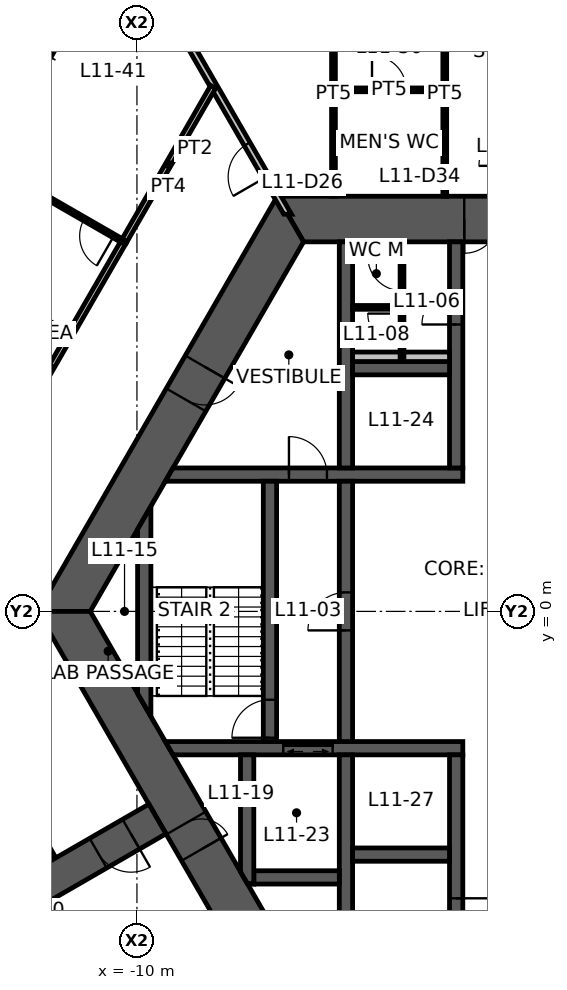
"""IFC4 building model, lengths in metres.
Left out: names, types, materials, properties, quantities, classifications, styles, units other than length and angle.
Written with IfcOpenShell. Run it as: python <this file> out.ifc"""

import sys

from ifc_helpers import new_model, si_unit, direction, frame, frame_2d, origin, place, context, subcontext, project, spatial, polyline, rectangle, outline, extrude, element, fill, save


model = new_model("IFC4")
c1 = context("Model", 3, precision=1e-05, world=origin(), true_north=direction((0.0, 1.0)))
c2 = subcontext(c1, "Body", "Model", "MODEL_VIEW")
j1 = project(units=[si_unit("LENGTHUNIT", "METRE"), si_unit("PLANEANGLEUNIT", "RADIAN")], contexts=[c1])
p1 = place(None, origin())
s1 = spatial("IfcSite", under=j1, at=p1, CompositionType="ELEMENT")
p2 = place(p1, origin())
s2 = spatial("IfcBuilding", under=s1, at=p2, CompositionType="ELEMENT")
p3 = place(p2, frame((0.0, 0.0, 43.6)))
s3 = spatial("IfcBuildingStorey", under=s2, at=p3, CompositionType="ELEMENT", Elevation=43.6)
p4 = place(p3, frame((5.961, 10.325, 0.0), z_axis=(0.0, 0.0, 1.0), x_axis=(-1.0, 0.0, 0.0)))
e1 = element("IfcWall", 1, at=p4, inside=s3, PredefinedType="SHEAR", context=c2, shape_type="SweptSolid", body=[
    extrude(outline(polyline([(-0.346, -0.6), (4.574, -0.6), (5.474, -0.6), (6.449, -0.6), (7.349, -0.6), (12.269, -0.6), (11.576, 0.6), (7.349, 0.6), (6.449, 0.6), (5.474, 0.6), (4.574, 0.6), (0.346, 0.6), (-0.346, -0.6)])), origin(), (0.0, 0.0, 1.0), 4.2),
])
p5 = place(p4, frame((6.449, 0.0, 0.0)))
e2 = element("IfcOpeningElement", 2, at=p5, cuts=e1, PredefinedType="OPENING", context=c2, shape_type="SweptSolid", body=[
    extrude(rectangle(XDim=0.9, YDim=2.1, at=frame_2d((0.45, 1.05))), frame((0.0, 0.61, 0.0), z_axis=(0.0, -1.0, 0.0), x_axis=(1.0, 0.0, 0.0)), (0.0, 0.0, 1.0), 1.22),
])
p6 = place(p4, frame((4.574, 0.0, 0.0)))
e3 = element("IfcOpeningElement", 3, at=p6, cuts=e1, PredefinedType="OPENING", context=c2, shape_type="SweptSolid", body=[
    extrude(rectangle(XDim=0.9, YDim=2.1, at=frame_2d((0.45, 1.05))), frame((0.0, 0.61, 0.0), z_axis=(0.0, -1.0, 0.0), x_axis=(1.0, 0.0, 0.0)), (0.0, 0.0, 1.0), 1.22),
])
p7 = place(p3, frame((-5.961, 10.325, 0.0), z_axis=(0.0, 0.0, 1.0), x_axis=(-0.500004296715, -0.866022923061, 0.0)))
e4 = element("IfcWall", 4, at=p7, inside=s3, PredefinedType="SHEAR", context=c2, shape_type="SweptSolid", body=[
    extrude(outline(polyline([(-0.346, -0.6), (4.494, -0.6), (5.494, -0.6), (12.269, -0.6), (11.576, 0.6), (5.494, 0.6), (4.494, 0.6), (0.346, 0.6), (-0.346, -0.6)])), origin(), (0.0, 0.0, 1.0), 4.2),
])
p8 = place(p7, frame((4.494, 0.0, 0.0)))
e5 = element("IfcOpeningElement", 5, at=p8, cuts=e4, PredefinedType="OPENING", context=c2, shape_type="SweptSolid", body=[
    extrude(rectangle(XDim=1.0, YDim=2.1, at=frame_2d((0.5, 1.05))), frame((0.0, 0.61, 0.0), z_axis=(0.0, -1.0, 0.0), x_axis=(1.0, 0.0, 0.0)), (0.0, 0.0, 1.0), 1.22),
])
p9 = place(p3, frame((-11.922, 0.0, 0.0), z_axis=(0.0, 0.0, 1.0), x_axis=(0.500004296715, -0.866022923061, 0.0)))
e6 = element("IfcWall", 6, at=p9, inside=s3, PredefinedType="SHEAR", context=c2, shape_type="SweptSolid", body=[
    extrude(outline(polyline([(-0.346, -0.6), (6.431, -0.6), (7.231, -0.6), (12.269, -0.6), (11.576, 0.6), (7.231, 0.6), (6.431, 0.6), (0.346, 0.6), (-0.346, -0.6)])), origin(), (0.0, 0.0, 1.0), 4.2),
])
p10 = place(p9, frame((6.431, 0.0, 0.0)))
e7 = element("IfcOpeningElement", 7, at=p10, cuts=e6, PredefinedType="OPENING", context=c2, shape_type="SweptSolid", body=[
    extrude(rectangle(XDim=0.8, YDim=2.1, at=frame_2d((0.4, 1.05))), frame((0.0, 0.61, 0.0), z_axis=(0.0, -1.0, 0.0), x_axis=(1.0, 0.0, 0.0)), (0.0, 0.0, 1.0), 1.22),
])
p11 = place(p3, frame((-9.461, -5.462, 0.0), z_axis=(0.0, 0.0, 1.0), x_axis=(-0.866019116917, -0.500010889016, 0.0)))
e8 = element("IfcWall", 8, at=p11, inside=s3, PredefinedType="SHEAR", context=c2, shape_type="SweptSolid", body=[
    extrude(rectangle(XDim=7.595, YDim=0.9, at=frame_2d((3.798, 0.0))), origin(), (0.0, 0.0, 1.0), 4.2),
])
p12 = place(p11, frame((0.8, 0.0, 0.0)))
e9 = element("IfcOpeningElement", 9, at=p12, cuts=e8, PredefinedType="OPENING", context=c2, shape_type="SweptSolid", body=[
    extrude(rectangle(XDim=1.0, YDim=2.1, at=frame_2d((0.5, 1.05))), frame((0.0, 0.46, 0.0), z_axis=(0.0, -1.0, 0.0), x_axis=(1.0, 0.0, 0.0)), (0.0, 0.0, 1.0), 0.92),
])
p13 = place(p3, frame((-9.151, 3.6, 0.0), z_axis=(0.0, 0.0, 1.0), x_axis=(1.0, 0.0, 0.0)))
e10 = element("IfcWall", 10, at=p13, inside=s3, PredefinedType="SHEAR", context=c2, shape_type="SweptSolid", body=[
    extrude(outline(polyline([(-0.101, -0.175), (3.151, -0.175), (4.151, -0.175), (7.726, -0.175), (7.726, 0.175), (4.151, 0.175), (3.151, 0.175), (0.101, 0.175), (-0.101, -0.175)])), origin(), (0.0, 0.0, 1.0), 4.2),
])
p14 = place(p13, frame((3.151, 0.0, 0.0)))
e11 = element("IfcOpeningElement", 11, at=p14, cuts=e10, PredefinedType="OPENING", context=c2, shape_type="SweptSolid", body=[
    extrude(rectangle(XDim=1.0, YDim=2.1, at=frame_2d((0.5, 1.05))), frame((0.0, 0.185, 0.0), z_axis=(0.0, -1.0, 0.0), x_axis=(1.0, 0.0, 0.0)), (0.0, 0.0, 1.0), 0.37),
])
p15 = place(p3, frame((-9.151, -3.6, 0.0), z_axis=(0.0, 0.0, 1.0), x_axis=(1.0, 0.0, 0.0)))
e12 = element("IfcWall", 12, at=p15, inside=s3, PredefinedType="SHEAR", context=c2, shape_type="SweptSolid", body=[
    extrude(outline(polyline([(0.101, -0.175), (3.001, -0.175), (4.301, -0.175), (7.726, -0.175), (7.726, 0.175), (4.301, 0.175), (3.001, 0.175), (-0.101, 0.175), (0.101, -0.175)])), origin(), (0.0, 0.0, 1.0), 4.2),
])
p16 = place(p15, frame((3.001, 0.0, 0.0)))
e13 = element("IfcOpeningElement", 13, at=p16, cuts=e12, PredefinedType="OPENING", context=c2, shape_type="SweptSolid", body=[
    extrude(rectangle(XDim=1.3, YDim=2.1, at=frame_2d((0.65, 1.05))), frame((0.0, 0.185, 0.0), z_axis=(0.0, -1.0, 0.0), x_axis=(1.0, 0.0, 0.0)), (0.0, 0.0, 1.0), 0.37),
])
p17 = place(p3, frame((-1.6, 3.775, 0.0), z_axis=(0.0, 0.0, 1.0), x_axis=(0.0, 1.0, 0.0)))
e14 = element("IfcWall", 14, at=p17, inside=s3, PredefinedType="SHEAR", context=c2, shape_type="SweptSolid", body=[
    extrude(rectangle(XDim=5.95, YDim=0.35, at=frame_2d((2.975, 0.0))), origin(), (0.0, 0.0, 1.0), 4.2),
])
p18 = place(p17, frame((3.775, 0.0, 0.0)))
e15 = element("IfcOpeningElement", 15, at=p18, cuts=e14, PredefinedType="OPENING", context=c2, shape_type="SweptSolid", body=[
    extrude(rectangle(XDim=0.9, YDim=2.1, at=frame_2d((0.45, 1.05))), frame((0.0, 0.185, 0.0), z_axis=(0.0, -1.0, 0.0), x_axis=(1.0, 0.0, 0.0)), (0.0, 0.0, 1.0), 0.37),
])
p19 = place(p3, frame((-1.6, -3.775, 0.0), z_axis=(0.0, 0.0, 1.0), x_axis=(0.0, -1.0, 0.0)))
e16 = element("IfcWall", 16, at=p19, inside=s3, PredefinedType="SHEAR", context=c2, shape_type="SweptSolid", body=[
    extrude(rectangle(XDim=5.95, YDim=0.35, at=frame_2d((2.975, 0.0))), origin(), (0.0, 0.0, 1.0), 4.2),
])
p20 = place(p19, frame((3.775, 0.0, 0.0)))
e17 = element("IfcOpeningElement", 17, at=p20, cuts=e16, PredefinedType="OPENING", context=c2, shape_type="SweptSolid", body=[
    extrude(rectangle(XDim=0.9, YDim=2.1, at=frame_2d((0.45, 1.05))), frame((0.0, 0.185, 0.0), z_axis=(0.0, -1.0, 0.0), x_axis=(1.0, 0.0, 0.0)), (0.0, 0.0, 1.0), 0.37),
])
p21 = place(p3, frame((-4.5, -3.425, 0.0), z_axis=(0.0, 0.0, 1.0), x_axis=(0.0, 1.0, 0.0)))
e18 = element("IfcWall", 18, at=p21, inside=s3, PredefinedType="SHEAR", context=c2, shape_type="SweptSolid", body=[
    extrude(rectangle(XDim=6.85, YDim=0.35, at=frame_2d((3.425, 0.0))), origin(), (0.0, 0.0, 1.0), 4.2),
])
p22 = place(p21, frame((2.925, 0.0, 0.0)))
e19 = element("IfcOpeningElement", 19, at=p22, cuts=e18, PredefinedType="OPENING", context=c2, shape_type="SweptSolid", body=[
    extrude(rectangle(XDim=1.0, YDim=2.1, at=frame_2d((0.5, 1.05))), frame((0.0, 0.185, 0.0), z_axis=(0.0, -1.0, 0.0), x_axis=(1.0, 0.0, 0.0)), (0.0, 0.0, 1.0), 0.37),
])
p23 = place(p3, frame((-6.5, -3.425, 0.0), z_axis=(0.0, 0.0, 1.0), x_axis=(0.0, 1.0, 0.0)))
e20 = element("IfcWall", 20, at=p23, inside=s3, PredefinedType="SHEAR", context=c2, shape_type="SweptSolid", body=[
    extrude(rectangle(XDim=6.85, YDim=0.35, at=frame_2d((3.425, 0.0))), origin(), (0.0, 0.0, 1.0), 4.2),
])
p24 = place(p23, frame((0.1, 0.0, 0.0)))
e21 = element("IfcOpeningElement", 21, at=p24, cuts=e20, PredefinedType="OPENING", context=c2, shape_type="SweptSolid", body=[
    extrude(rectangle(XDim=1.0, YDim=2.1, at=frame_2d((0.5, 1.05))), frame((0.0, 0.185, 0.0), z_axis=(0.0, -1.0, 0.0), x_axis=(1.0, 0.0, 0.0)), (0.0, 0.0, 1.0), 0.37),
])
for number, where, z_axis, x_axis in (
    (22, (-4.5, 3.775, 0.0), (0.0, 0.0, 1.0), (0.0, 1.0, 0.0)),
    (23, (-4.5, -3.775, 0.0), (0.0, 0.0, 1.0), (0.0, -1.0, 0.0)),
):
    element("IfcWall", number, at=place(p3, frame(where, z_axis=z_axis, x_axis=x_axis)), inside=s3, PredefinedType="SHEAR", context=c2, shape_type="SweptSolid", body=[
        extrude(rectangle(XDim=5.95, YDim=0.35, at=frame_2d((2.975, 0.0))), origin(), (0.0, 0.0, 1.0), 4.2),
    ])
for number, where, z_axis, x_axis in (
    (24, (-4.325, 6.4, 0.0), (0.0, 0.0, 1.0), (1.0, 0.0, 0.0)),
    (25, (-4.325, -6.4, 0.0), (0.0, 0.0, 1.0), (1.0, 0.0, 0.0)),
):
    element("IfcWall", number, at=place(p3, frame(where, z_axis=z_axis, x_axis=x_axis)), inside=s3, PredefinedType="SHEAR", context=c2, shape_type="SweptSolid", body=[
        extrude(rectangle(XDim=2.55, YDim=0.35, at=frame_2d((1.275, 0.0))), origin(), (0.0, 0.0, 1.0), 4.2),
    ])
p25 = place(p3, frame((-6.925, -7.0, 0.0), z_axis=(0.0, 0.0, 1.0), x_axis=(1.0, 0.0, 0.0)))
e26 = element("IfcWall", 26, at=p25, inside=s3, PredefinedType="SHEAR", context=c2, shape_type="SweptSolid", body=[
    extrude(rectangle(XDim=2.25, YDim=0.35, at=frame_2d((1.125, 0.0))), origin(), (0.0, 0.0, 1.0), 4.2),
])
p26 = place(p3, frame((-7.1, -3.775, 0.0), z_axis=(0.0, 0.0, 1.0), x_axis=(0.0, -1.0, 0.0)))
e27 = element("IfcWall", 27, at=p26, inside=s3, PredefinedType="SHEAR", context=c2, shape_type="SweptSolid", body=[
    extrude(outline(polyline([(0.0, -0.175), (3.074, -0.175), (3.377, 0.0), (3.4, 0.175), (0.0, 0.175), (0.0, -0.175)])), origin(), (0.0, 0.0, 1.0), 4.2),
])
p27 = place(p3, frame((-9.808, -2.462, 0.0), z_axis=(0.0, 0.0, 1.0), x_axis=(0.0, 1.0, 0.0)))
e28 = element("IfcWall", 28, at=p27, inside=s3, PredefinedType="SHEAR", context=c2, shape_type="SweptSolid", body=[
    extrude(outline(polyline([(-0.303, -0.175), (5.228, -0.175), (4.621, 0.175), (0.303, 0.175), (-0.303, -0.175)])), origin(), (0.0, 0.0, 1.0), 4.2),
])
p28 = place(p3, frame((-4.325, 6.7, 0.0), z_axis=(0.0, 0.0, 1.0), x_axis=(1.0, 0.0, 0.0)))
e29 = element("IfcWall", 29, at=p28, inside=s3, PredefinedType="PLUMBINGWALL", context=c2, shape_type="SweptSolid", body=[
    extrude(rectangle(XDim=2.55, YDim=0.25, at=frame_2d((1.275, 0.0))), origin(), (0.0, 0.0, 1.0), 4.2),
])
p29 = place(p3, frame((-3.025, 6.575, 0.0), z_axis=(0.0, 0.0, 1.0), x_axis=(0.0, 1.0, 0.0)))
e30 = element("IfcWall", 30, at=p29, inside=s3, PredefinedType="PARTITIONING", context=c2, shape_type="SweptSolid", body=[
    extrude(rectangle(XDim=3.15, YDim=0.1, at=frame_2d((1.575, 0.0))), origin(), (0.0, 0.0, 1.0), 3.23),
])
p30 = place(p29, frame((1.863, 0.0, 0.0)))
e31 = element("IfcOpeningElement", 31, at=p30, cuts=e30, PredefinedType="OPENING", context=c2, shape_type="SweptSolid", body=[
    extrude(rectangle(XDim=0.9, YDim=2.1, at=frame_2d((0.45, 1.05))), frame((0.0, 0.06, 0.0), z_axis=(0.0, -1.0, 0.0), x_axis=(1.0, 0.0, 0.0)), (0.0, 0.0, 1.0), 0.12),
])
p31 = place(p29, frame((0.363, 0.0, 0.0)))
e32 = element("IfcOpeningElement", 32, at=p31, cuts=e30, PredefinedType="OPENING", context=c2, shape_type="SweptSolid", body=[
    extrude(rectangle(XDim=0.9, YDim=2.1, at=frame_2d((0.45, 1.05))), frame((0.0, 0.06, 0.0), z_axis=(0.0, -1.0, 0.0), x_axis=(1.0, 0.0, 0.0)), (0.0, 0.0, 1.0), 0.12),
])
p32 = place(p3, frame((-3.075, 8.0, 0.0), z_axis=(0.0, 0.0, 1.0), x_axis=(-1.0, 0.0, 0.0)))
e33 = element("IfcWall", 33, at=p32, inside=s3, PredefinedType="PARTITIONING", context=c2, shape_type="SweptSolid", body=[
    extrude(rectangle(XDim=1.25, YDim=0.1, at=frame_2d((0.625, 0.0))), origin(), (0.0, 0.0, 1.0), 3.23),
])
p33 = place(p3, frame((-6.035, 10.453, 0.0), z_axis=(0.0, 0.0, 1.0), x_axis=(-0.499993402427, 0.866029212861, 0.0)))
e34 = element("IfcWall", 34, at=p33, inside=s3, PredefinedType="PARTITIONING", context=c2, shape_type="SweptSolid", body=[
    extrude(outline(polyline([(-0.051, -0.087), (1.129, -0.087), (2.129, -0.087), (7.93, -0.087), (7.93, 0.087), (2.129, 0.087), (1.129, 0.087), (0.051, 0.087), (-0.051, -0.087)])), origin(), (0.0, 0.0, 1.0), 3.33),
])
p34 = place(p33, frame((1.129, 0.0, 0.0)))
e35 = element("IfcOpeningElement", 35, at=p34, cuts=e34, PredefinedType="OPENING", context=c2, shape_type="SweptSolid", body=[
    extrude(rectangle(XDim=1.0, YDim=2.1, at=frame_2d((0.5, 1.05))), frame((0.0, 0.098, 0.0), z_axis=(0.0, -1.0, 0.0), x_axis=(1.0, 0.0, 0.0)), (0.0, 0.0, 1.0), 0.195),
])
p35 = place(p3, frame((-4.829, 13.725, 0.0), z_axis=(0.0, 0.0, 1.0), x_axis=(1.0, 0.0, 0.0)))
e36 = element("IfcWall", 36, at=p35, inside=s3, PredefinedType="PARTITIONING", context=c2, shape_type="SweptSolid", body=[
    extrude(rectangle(XDim=2.929, YDim=0.1, at=frame_2d((1.464, 0.0))), origin(), (0.0, 0.0, 1.0), 3.23),
])
p36 = place(p35, frame((1.014, 0.0, 0.0)))
e37 = element("IfcOpeningElement", 37, at=p36, cuts=e36, PredefinedType="OPENING", context=c2, shape_type="SweptSolid", body=[
    extrude(rectangle(XDim=0.9, YDim=2.1, at=frame_2d((0.45, 1.05))), frame((0.0, 0.06, 0.0), z_axis=(0.0, -1.0, 0.0), x_axis=(1.0, 0.0, 0.0)), (0.0, 0.0, 1.0), 0.12),
])
for number, where, z_axis, x_axis in (
    (38, (-1.9, 10.925, 0.0), (0.0, 0.0, 1.0), (0.0, 1.0, 0.0)),
    (39, (-4.829, 10.925, 0.0), (0.0, 0.0, 1.0), (0.0, 1.0, 0.0)),
):
    element("IfcWall", number, at=place(p3, frame(where, z_axis=z_axis, x_axis=x_axis)), inside=s3, PredefinedType="PARTITIONING", context=c2, shape_type="SweptSolid", body=[
        extrude(rectangle(XDim=5.0, YDim=0.1, at=frame_2d((2.5, 0.0))), origin(), (0.0, 0.0, 1.0), 3.23),
    ])
p37 = place(p3, frame((-10.352, 9.719, 0.0), z_axis=(0.0, 0.0, 1.0), x_axis=(0.499985273446, 0.866033905998, 0.0)))
e40 = element("IfcWall", 40, at=p37, inside=s3, PredefinedType="PARTITIONING", context=c2, shape_type="SweptSolid", body=[
    extrude(rectangle(XDim=4.718, YDim=0.15, at=frame_2d((2.359, 0.0))), origin(), (0.0, 0.0, 1.0), 3.23),
])
p38 = place(p3, frame((-12.208, -6.506, 0.0), z_axis=(0.0, 0.0, 1.0), x_axis=(-0.499984092097, 0.866034588021, 0.0)))
e41 = element("IfcWall", 41, at=p38, inside=s3, PredefinedType="PARTITIONING", context=c2, shape_type="SweptSolid", body=[
    extrude(rectangle(XDim=7.512, YDim=0.15, at=frame_2d((3.756, 0.0))), origin(), (0.0, 0.0, 1.0), 3.23),
])
p39 = place(p38, frame((3.256, 0.0, 0.0)))
e42 = element("IfcOpeningElement", 42, at=p39, cuts=e41, PredefinedType="OPENING", context=c2, shape_type="SweptSolid", body=[
    extrude(rectangle(XDim=1.0, YDim=2.1, at=frame_2d((0.5, 1.05))), frame((0.0, 0.085, 0.0), z_axis=(0.0, -1.0, 0.0), x_axis=(1.0, 0.0, 0.0)), (0.0, 0.0, 1.0), 0.17),
])
p40 = place(p3, frame((-13.598, 4.097, 0.0), z_axis=(0.0, 0.0, 1.0), x_axis=(0.49998791073, 0.866032383415, 0.0)))
e43 = element("IfcWall", 43, at=p40, inside=s3, PredefinedType="PARTITIONING", context=c2, shape_type="SweptSolid", body=[
    extrude(rectangle(XDim=6.502, YDim=0.15, at=frame_2d((3.251, 0.0))), origin(), (0.0, 0.0, 1.0), 3.23),
])
p41 = place(p40, frame((2.751, 0.0, 0.0)))
e44 = element("IfcOpeningElement", 44, at=p41, cuts=e43, PredefinedType="OPENING", context=c2, shape_type="SweptSolid", body=[
    extrude(rectangle(XDim=1.0, YDim=2.1, at=frame_2d((0.5, 1.05))), frame((0.0, 0.085, 0.0), z_axis=(0.0, -1.0, 0.0), x_axis=(1.0, 0.0, 0.0)), (0.0, 0.0, 1.0), 0.17),
])
p42 = place(p3, frame((-10.347, 9.728, 0.0), z_axis=(0.0, 0.0, 1.0), x_axis=(-0.866583023507, 0.499032928142, 0.0)))
e45 = element("IfcWall", 45, at=p42, inside=s3, PredefinedType="PARTITIONING", context=c2, shape_type="SweptSolid", body=[
    extrude(rectangle(XDim=3.975, YDim=0.1, at=frame_2d((1.988, 0.0))), origin(), (0.0, 0.0, 1.0), 3.23),
])
p43 = place(p42, frame((0.3, 0.0, 0.0)))
e46 = element("IfcOpeningElement", 46, at=p43, cuts=e45, PredefinedType="OPENING", context=c2, shape_type="SweptSolid", body=[
    extrude(rectangle(XDim=0.9, YDim=2.1, at=frame_2d((0.45, 1.05))), frame((0.0, 0.06, 0.0), z_axis=(0.0, -1.0, 0.0), x_axis=(1.0, 0.0, 0.0)), (0.0, 0.0, 1.0), 0.12),
])
p44 = place(p5, origin())
e47 = element("IfcDoor", 47, at=p44, inside=s3, OperationType="SINGLE_SWING_RIGHT", PredefinedType="DOOR", context=c2, shape_type="SweptSolid", body=[
    extrude(rectangle(XDim=0.9, YDim=2.1, at=frame_2d((0.45, 1.05))), frame((0.0, 0.025, 0.0), z_axis=(0.0, -1.0, 0.0), x_axis=(1.0, 0.0, 0.0)), (0.0, 0.0, 1.0), 0.05),
])
fill(e2, e47)
p45 = place(p10, origin())
e48 = element("IfcDoor", 48, at=p45, inside=s3, OperationType="SINGLE_SWING_RIGHT", PredefinedType="DOOR", context=c2, shape_type="SweptSolid", body=[
    extrude(rectangle(XDim=0.8, YDim=2.1, at=frame_2d((0.4, 1.05))), frame((0.0, 0.025, 0.0), z_axis=(0.0, -1.0, 0.0), x_axis=(1.0, 0.0, 0.0)), (0.0, 0.0, 1.0), 0.05),
])
fill(e7, e48)
p46 = place(p8, origin())
e49 = element("IfcDoor", 49, at=p46, inside=s3, OperationType="SINGLE_SWING_LEFT", PredefinedType="DOOR", context=c2, shape_type="SweptSolid", body=[
    extrude(rectangle(XDim=1.0, YDim=2.1, at=frame_2d((0.5, 1.05))), frame((0.0, 0.025, 0.0), z_axis=(0.0, -1.0, 0.0), x_axis=(1.0, 0.0, 0.0)), (0.0, 0.0, 1.0), 0.05),
])
fill(e5, e49)
p47 = place(p22, origin())
e50 = element("IfcDoor", 50, at=p47, inside=s3, OperationType="SINGLE_SWING_LEFT", PredefinedType="DOOR", context=c2, shape_type="SweptSolid", body=[
    extrude(rectangle(XDim=1.0, YDim=2.1, at=frame_2d((0.5, 1.05))), frame((0.0, 0.025, 0.0), z_axis=(0.0, -1.0, 0.0), x_axis=(1.0, 0.0, 0.0)), (0.0, 0.0, 1.0), 0.05),
])
fill(e19, e50)
p48 = place(p24, origin())
e51 = element("IfcDoor", 51, at=p48, inside=s3, OperationType="SINGLE_SWING_LEFT", PredefinedType="DOOR", context=c2, shape_type="SweptSolid", body=[
    extrude(rectangle(XDim=1.0, YDim=2.1, at=frame_2d((0.5, 1.05))), frame((0.0, 0.025, 0.0), z_axis=(0.0, -1.0, 0.0), x_axis=(1.0, 0.0, 0.0)), (0.0, 0.0, 1.0), 0.05),
])
fill(e21, e51)
p49 = place(p14, origin())
e52 = element("IfcDoor", 52, at=p49, inside=s3, OperationType="SINGLE_SWING_LEFT", PredefinedType="DOOR", context=c2, shape_type="SweptSolid", body=[
    extrude(rectangle(XDim=1.0, YDim=2.1, at=frame_2d((0.5, 1.05))), frame((0.0, 0.025, 0.0), z_axis=(0.0, -1.0, 0.0), x_axis=(1.0, 0.0, 0.0)), (0.0, 0.0, 1.0), 0.05),
])
fill(e11, e52)
p50 = place(p18, origin())
e53 = element("IfcDoor", 53, at=p50, inside=s3, OperationType="SINGLE_SWING_LEFT", PredefinedType="DOOR", context=c2, shape_type="SweptSolid", body=[
    extrude(rectangle(XDim=0.9, YDim=2.1, at=frame_2d((0.45, 1.05))), frame((0.0, 0.025, 0.0), z_axis=(0.0, -1.0, 0.0), x_axis=(1.0, 0.0, 0.0)), (0.0, 0.0, 1.0), 0.05),
])
fill(e15, e53)
p51 = place(p20, origin())
e54 = element("IfcDoor", 54, at=p51, inside=s3, OperationType="SINGLE_SWING_LEFT", PredefinedType="DOOR", context=c2, shape_type="SweptSolid", body=[
    extrude(rectangle(XDim=0.9, YDim=2.1, at=frame_2d((0.45, 1.05))), frame((0.0, 0.025, 0.0), z_axis=(0.0, -1.0, 0.0), x_axis=(1.0, 0.0, 0.0)), (0.0, 0.0, 1.0), 0.05),
])
fill(e17, e54)
p52 = place(p12, origin())
e55 = element("IfcDoor", 55, at=p52, inside=s3, OperationType="SINGLE_SWING_LEFT", PredefinedType="DOOR", context=c2, shape_type="SweptSolid", body=[
    extrude(rectangle(XDim=1.0, YDim=2.1, at=frame_2d((0.5, 1.05))), frame((0.0, 0.025, 0.0), z_axis=(0.0, -1.0, 0.0), x_axis=(1.0, 0.0, 0.0)), (0.0, 0.0, 1.0), 0.05),
])
fill(e9, e55)
p53 = place(p30, origin())
e56 = element("IfcDoor", 56, at=p53, inside=s3, OperationType="SINGLE_SWING_RIGHT", PredefinedType="DOOR", context=c2, shape_type="SweptSolid", body=[
    extrude(rectangle(XDim=0.9, YDim=2.1, at=frame_2d((0.45, 1.05))), frame((0.0, 0.025, 0.0), z_axis=(0.0, -1.0, 0.0), x_axis=(1.0, 0.0, 0.0)), (0.0, 0.0, 1.0), 0.05),
])
fill(e31, e56)
p54 = place(p31, origin())
e57 = element("IfcDoor", 57, at=p54, inside=s3, OperationType="SINGLE_SWING_RIGHT", PredefinedType="DOOR", context=c2, shape_type="SweptSolid", body=[
    extrude(rectangle(XDim=0.9, YDim=2.1, at=frame_2d((0.45, 1.05))), frame((0.0, 0.025, 0.0), z_axis=(0.0, -1.0, 0.0), x_axis=(1.0, 0.0, 0.0)), (0.0, 0.0, 1.0), 0.05),
])
fill(e32, e57)
p55 = place(p34, origin())
e58 = element("IfcDoor", 58, at=p55, inside=s3, OperationType="SINGLE_SWING_LEFT", PredefinedType="DOOR", context=c2, shape_type="SweptSolid", body=[
    extrude(rectangle(XDim=1.0, YDim=2.1, at=frame_2d((0.5, 1.05))), frame((0.0, 0.025, 0.0), z_axis=(0.0, -1.0, 0.0), x_axis=(1.0, 0.0, 0.0)), (0.0, 0.0, 1.0), 0.05),
])
fill(e35, e58)
p56 = place(p36, origin())
e59 = element("IfcDoor", 59, at=p56, inside=s3, OperationType="SINGLE_SWING_LEFT", PredefinedType="DOOR", context=c2, shape_type="SweptSolid", body=[
    extrude(rectangle(XDim=0.9, YDim=2.1, at=frame_2d((0.45, 1.05))), frame((0.0, 0.025, 0.0), z_axis=(0.0, -1.0, 0.0), x_axis=(1.0, 0.0, 0.0)), (0.0, 0.0, 1.0), 0.05),
])
fill(e37, e59)
p57 = place(p41, origin())
e60 = element("IfcDoor", 60, at=p57, inside=s3, OperationType="SINGLE_SWING_RIGHT", PredefinedType="DOOR", context=c2, shape_type="SweptSolid", body=[
    extrude(rectangle(XDim=1.0, YDim=2.1, at=frame_2d((0.5, 1.05))), frame((0.0, 0.025, 0.0), z_axis=(0.0, -1.0, 0.0), x_axis=(1.0, 0.0, 0.0)), (0.0, 0.0, 1.0), 0.05),
])
fill(e44, e60)
p58 = place(p43, origin())
e61 = element("IfcDoor", 61, at=p58, inside=s3, OperationType="SINGLE_SWING_LEFT", PredefinedType="DOOR", context=c2, shape_type="SweptSolid", body=[
    extrude(rectangle(XDim=0.9, YDim=2.1, at=frame_2d((0.45, 1.05))), frame((0.0, 0.025, 0.0), z_axis=(0.0, -1.0, 0.0), x_axis=(1.0, 0.0, 0.0)), (0.0, 0.0, 1.0), 0.05),
])
fill(e46, e61)
p59 = place(p16, origin())
e62 = element("IfcDoor", 62, at=p59, inside=s3, OperationType="DOUBLE_DOOR_SLIDING", PredefinedType="DOOR", context=c2, shape_type="SweptSolid", body=[
    extrude(rectangle(XDim=1.3, YDim=2.1, at=frame_2d((0.65, 1.05))), frame((0.0, 0.025, 0.0), z_axis=(0.0, -1.0, 0.0), x_axis=(1.0, 0.0, 0.0)), (0.0, 0.0, 1.0), 0.05),
])
fill(e13, e62)
save(model, sys.argv[1])
